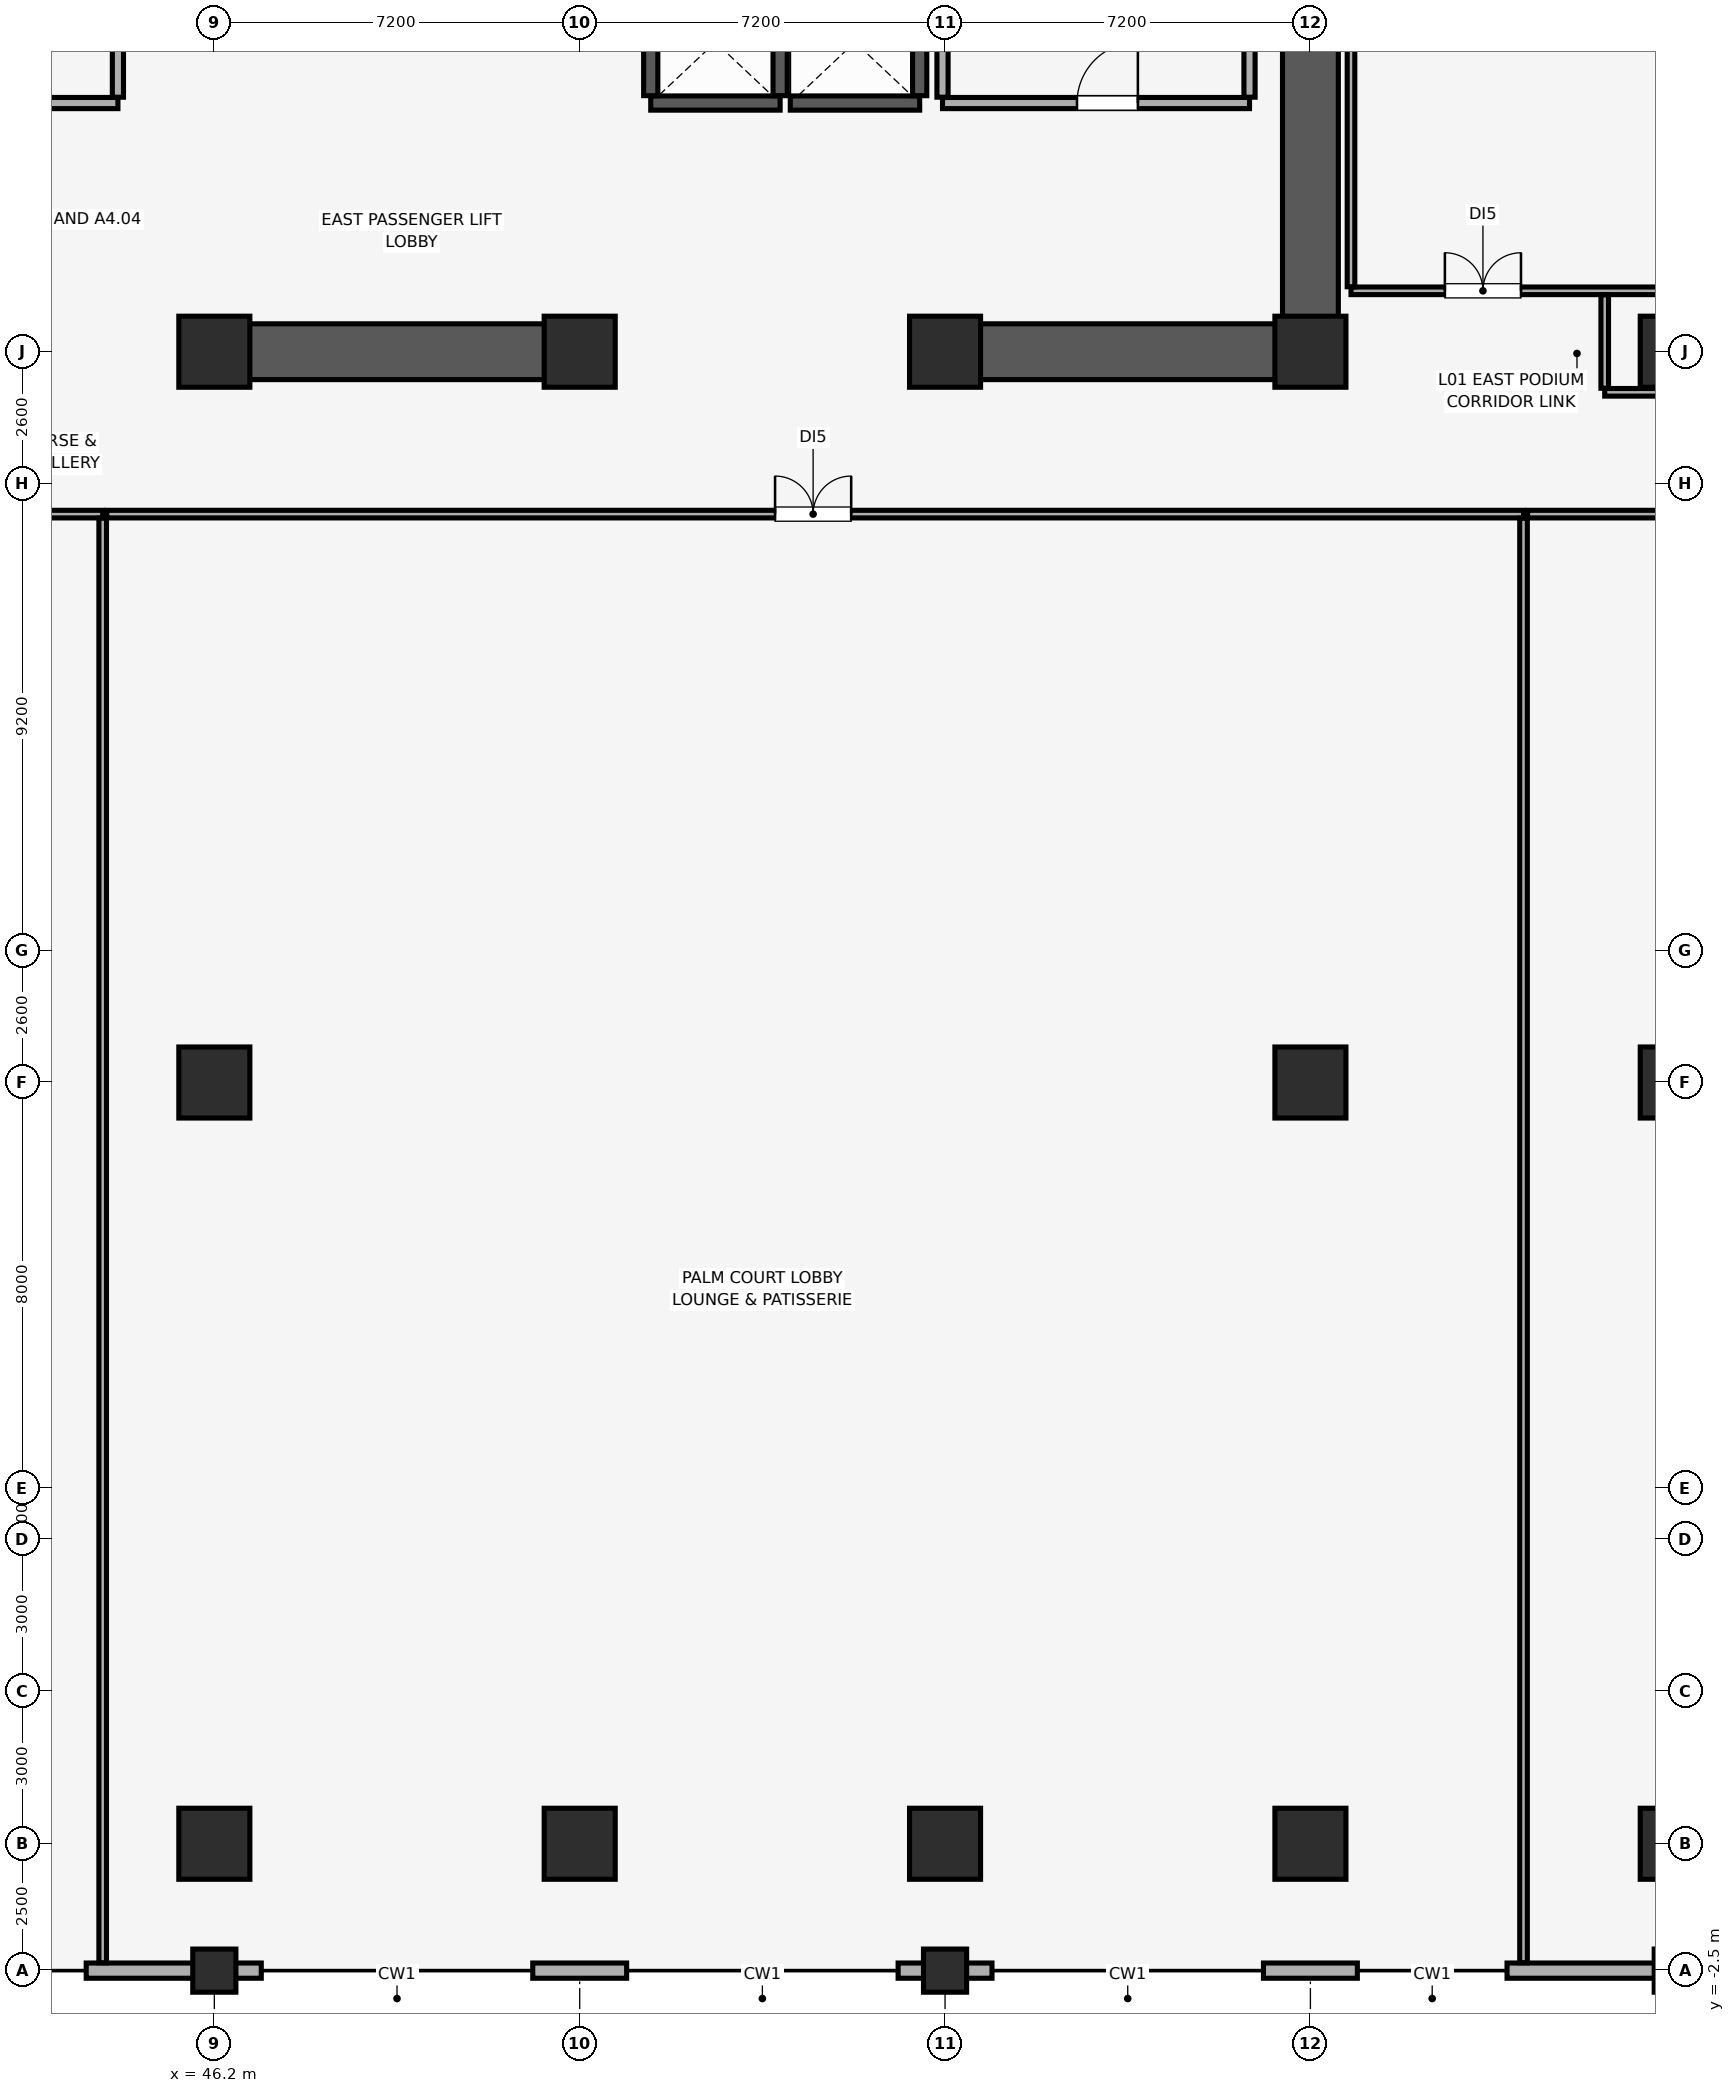
"""IFC4 building model, lengths in metres.
Left out: names, types, materials, properties, quantities, classifications, styles, units other than length and angle.
Written with IfcOpenShell. Run it as: python <this file> out.ifc"""

import sys

from ifc_helpers import new_model, si_unit, direction, frame, frame_2d, origin, origin_2d, place, context, subcontext, project, spatial, rectangle, extrude, element, fill, save


model = new_model("IFC4")
c1 = context("Model", 3, precision=1e-05, world=origin(), true_north=direction((0.0, 1.0)))
c2 = subcontext(c1, "Body", "Model", "MODEL_VIEW")
j1 = project(units=[si_unit("LENGTHUNIT", "METRE"), si_unit("PLANEANGLEUNIT", "RADIAN")], contexts=[c1])
p1 = place(None, origin())
s1 = spatial("IfcSite", under=j1, at=p1, CompositionType="ELEMENT")
p2 = place(p1, origin())
s2 = spatial("IfcBuilding", under=s1, at=p2, CompositionType="ELEMENT")
p3 = place(p2, frame((0.0, 0.0, 8.0)))
s3 = spatial("IfcBuildingStorey", under=s2, at=p3, CompositionType="ELEMENT", Elevation=8.0)
for number, where, z_axis, x_axis in (
    (1, (46.2, -2.5, 0.0), (0.0, 0.0, 1.0), (1.0, 0.0, 0.0)),
    (2, (60.6, -2.5, 0.0), (0.0, 0.0, 1.0), (1.0, 0.0, 0.0)),
    (3, (75.0, -2.5, 0.0), (0.0, 0.0, 1.0), (1.0, 0.0, 0.0)),
):
    element("IfcColumn", number, at=place(p3, frame(where, z_axis=z_axis, x_axis=x_axis)), inside=s3, PredefinedType="COLUMN", context=c2, shape_type="SweptSolid", body=[
        extrude(rectangle(XDim=0.85, YDim=0.85, at=origin_2d()), origin(), (0.0, 0.0, 1.0), 5.68),
    ])
for number, where, z_axis, x_axis in (
    (4, (46.2, 0.0, 0.0), (0.0, 0.0, 1.0), (1.0, 0.0, 0.0)),
    (5, (46.2, 29.4, 0.0), (0.0, 0.0, 1.0), (1.0, 0.0, 0.0)),
    (6, (53.4, 0.0, 0.0), (0.0, 0.0, 1.0), (1.0, 0.0, 0.0)),
    (7, (53.4, 29.4, 0.0), (0.0, 0.0, 1.0), (1.0, 0.0, 0.0)),
    (8, (60.6, 0.0, 0.0), (0.0, 0.0, 1.0), (1.0, 0.0, 0.0)),
    (9, (60.6, 29.4, 0.0), (0.0, 0.0, 1.0), (1.0, 0.0, 0.0)),
    (10, (67.8, 0.0, 0.0), (0.0, 0.0, 1.0), (1.0, 0.0, 0.0)),
    (11, (67.8, 29.4, 0.0), (0.0, 0.0, 1.0), (1.0, 0.0, 0.0)),
    (12, (75.0, 0.0, 0.0), (0.0, 0.0, 1.0), (1.0, 0.0, 0.0)),
    (13, (75.0, 29.4, 0.0), (0.0, 0.0, 1.0), (1.0, 0.0, 0.0)),
    (14, (46.2, 15.0, 0.0), (0.0, 0.0, 1.0), (1.0, 0.0, 0.0)),
    (15, (75.0, 15.0, 0.0), (0.0, 0.0, 1.0), (1.0, 0.0, 0.0)),
    (16, (67.8, 15.0, 0.0), (0.0, 0.0, 1.0), (1.0, 0.0, 0.0)),
):
    element("IfcColumn", number, at=place(p3, frame(where, z_axis=z_axis, x_axis=x_axis)), inside=s3, PredefinedType="COLUMN", context=c2, shape_type="SweptSolid", body=[
        extrude(rectangle(XDim=1.4, YDim=1.4, at=origin_2d()), origin(), (0.0, 0.0, 1.0), 5.68),
    ])
p4 = place(p3, frame((43.675, -2.5, 0.0), z_axis=(0.0, 0.0, 1.0), x_axis=(1.0, 0.0, 0.0)))
e17 = element("IfcWall", 17, at=p4, inside=s3, PredefinedType="SOLIDWALL", context=c2, shape_type="SweptSolid", body=[
    extrude(rectangle(XDim=3.45, YDim=0.3, at=frame_2d((1.725, 0.0))), origin(), (0.0, 0.0, 1.0), 4.73),
])
for number, where, z_axis, x_axis in (
    (18, (52.475, -2.5, 0.0), (0.0, 0.0, 1.0), (1.0, 0.0, 0.0)),
    (19, (59.675, -2.5, 0.0), (0.0, 0.0, 1.0), (1.0, 0.0, 0.0)),
):
    element("IfcWall", number, at=place(p3, frame(where, z_axis=z_axis, x_axis=x_axis)), inside=s3, PredefinedType="SOLIDWALL", context=c2, shape_type="SweptSolid", body=[
        extrude(rectangle(XDim=1.85, YDim=0.3, at=frame_2d((0.925, 0.0))), origin(), (0.0, 0.0, 1.0), 4.73),
    ])
p5 = place(p3, frame((66.875, -2.5, 0.0), z_axis=(0.0, 0.0, 1.0), x_axis=(1.0, 0.0, 0.0)))
e20 = element("IfcWall", 20, at=p5, inside=s3, PredefinedType="SOLIDWALL", context=c2, shape_type="SweptSolid", body=[
    extrude(rectangle(XDim=1.85, YDim=0.3, at=frame_2d((0.925, 0.0))), origin(), (0.0, 0.0, 1.0), 4.73),
])
p6 = place(p3, frame((71.675, -2.5, 0.0), z_axis=(0.0, 0.0, 1.0), x_axis=(1.0, 0.0, 0.0)))
e21 = element("IfcWall", 21, at=p6, inside=s3, PredefinedType="SOLIDWALL", context=c2, shape_type="SweptSolid", body=[
    extrude(rectangle(XDim=11.925, YDim=0.3, at=frame_2d((5.962, 0.0))), origin(), (0.0, 0.0, 1.0), 4.73),
])
p7 = place(p6, frame((5.05, 0.0, 0.85)))
e22 = element("IfcOpeningElement", 22, at=p7, cuts=e21, PredefinedType="OPENING", context=c2, shape_type="SweptSolid", body=[
    extrude(rectangle(XDim=5.4, YDim=2.4, at=frame_2d((2.7, 1.2))), frame((0.0, 0.16, 0.0), z_axis=(0.0, -1.0, 0.0), x_axis=(1.0, 0.0, 0.0)), (0.0, 0.0, 1.0), 0.32),
])
p8 = place(p3, frame((67.8, 29.4, 0.0), z_axis=(0.0, 0.0, 1.0), x_axis=(0.0, 1.0, 0.0)))
e23 = element("IfcWall", 23, at=p8, inside=s3, PredefinedType="SHEAR", context=c2, shape_type="SweptSolid", body=[
    extrude(rectangle(XDim=19.2, YDim=1.1, at=frame_2d((9.6, 0.0))), origin(), (0.0, 0.0, 1.0), 5.68),
])
p9 = place(p3, frame((46.0, 29.4, 0.0), z_axis=(0.0, 0.0, 1.0), x_axis=(1.0, 0.0, 0.0)))
e24 = element("IfcWall", 24, at=p9, inside=s3, PredefinedType="SHEAR", context=c2, shape_type="SweptSolid", body=[
    extrude(rectangle(XDim=7.6, YDim=1.1, at=frame_2d((3.8, 0.0))), origin(), (0.0, 0.0, 1.0), 5.68),
])
p10 = place(p3, frame((60.4, 29.4, 0.0), z_axis=(0.0, 0.0, 1.0), x_axis=(1.0, 0.0, 0.0)))
e25 = element("IfcWall", 25, at=p10, inside=s3, PredefinedType="SHEAR", context=c2, shape_type="SweptSolid", body=[
    extrude(rectangle(XDim=6.845, YDim=1.1, at=frame_2d((3.423, 0.0))), origin(), (0.0, 0.0, 1.0), 5.68),
])
p11 = place(p3, frame((54.8, 34.3, 0.0), z_axis=(0.0, 0.0, 1.0), x_axis=(1.0, 0.0, 0.0)))
e26 = element("IfcWall", 26, at=p11, inside=s3, PredefinedType="SHEAR", context=c2, shape_type="SweptSolid", body=[
    extrude(rectangle(XDim=2.55, YDim=0.28, at=frame_2d((1.275, 0.0))), origin(), (0.0, 0.0, 1.0), 5.68),
])
for number, where, z_axis, x_axis in (
    (27, (54.8, 34.445, 0.0), (0.0, 0.0, 1.0), (0.0, 1.0, 0.0)),
    (28, (57.35, 34.445, 0.0), (0.0, 0.0, 1.0), (0.0, 1.0, 0.0)),
):
    element("IfcWall", number, at=place(p3, frame(where, z_axis=z_axis, x_axis=x_axis)), inside=s3, PredefinedType="SHEAR", context=c2, shape_type="SweptSolid", body=[
        extrude(rectangle(XDim=2.11, YDim=0.28, at=frame_2d((1.055, 0.0))), origin(), (0.0, 0.0, 1.0), 5.68),
    ])
p12 = place(p3, frame((57.55, 34.3, 0.0), z_axis=(0.0, 0.0, 1.0), x_axis=(1.0, 0.0, 0.0)))
e29 = element("IfcWall", 29, at=p12, inside=s3, PredefinedType="SHEAR", context=c2, shape_type="SweptSolid", body=[
    extrude(rectangle(XDim=2.55, YDim=0.28, at=frame_2d((1.275, 0.0))), origin(), (0.0, 0.0, 1.0), 5.68),
])
p13 = place(p3, frame((60.1, 34.445, 0.0), z_axis=(0.0, 0.0, 1.0), x_axis=(0.0, 1.0, 0.0)))
e30 = element("IfcWall", 30, at=p13, inside=s3, PredefinedType="SHEAR", context=c2, shape_type="SweptSolid", body=[
    extrude(rectangle(XDim=2.11, YDim=0.28, at=frame_2d((1.055, 0.0))), origin(), (0.0, 0.0, 1.0), 5.68),
])
p14 = place(p3, frame((60.55, 34.3, 0.0), z_axis=(0.0, 0.0, 1.0), x_axis=(1.0, 0.0, 0.0)))
e31 = element("IfcWall", 31, at=p14, inside=s3, PredefinedType="PARTITIONING", context=c2, shape_type="SweptSolid", body=[
    extrude(rectangle(XDim=6.05, YDim=0.22, at=frame_2d((3.025, 0.0))), origin(), (0.0, 0.0, 1.0), 5.68),
])
p15 = place(p14, frame((2.65, 0.0, 0.0)))
e32 = element("IfcOpeningElement", 32, at=p15, cuts=e31, PredefinedType="OPENING", context=c2, shape_type="SweptSolid", body=[
    extrude(rectangle(XDim=1.2, YDim=2.15, at=frame_2d((0.6, 1.075))), frame((0.0, 0.12, 0.0), z_axis=(0.0, -1.0, 0.0), x_axis=(1.0, 0.0, 0.0)), (0.0, 0.0, 1.0), 0.24),
])
p16 = place(p3, frame((60.55, 34.415, 0.0), z_axis=(0.0, 0.0, 1.0), x_axis=(0.0, 1.0, 0.0)))
e33 = element("IfcWall", 33, at=p16, inside=s3, PredefinedType="PARTITIONING", context=c2, shape_type="SweptSolid", body=[
    extrude(rectangle(XDim=5.64, YDim=0.22, at=frame_2d((2.82, 0.0))), origin(), (0.0, 0.0, 1.0), 5.68),
])
p17 = place(p3, frame((66.6, 34.415, 0.0), z_axis=(0.0, 0.0, 1.0), x_axis=(0.0, 1.0, 0.0)))
e34 = element("IfcWall", 34, at=p17, inside=s3, PredefinedType="PARTITIONING", context=c2, shape_type="SweptSolid", body=[
    extrude(rectangle(XDim=5.43, YDim=0.22, at=frame_2d((2.715, 0.0))), origin(), (0.0, 0.0, 1.0), 5.68),
])
p18 = place(p3, frame((39.7, 34.3, 0.0), z_axis=(0.0, 0.0, 1.0), x_axis=(1.0, 0.0, 0.0)))
e35 = element("IfcWall", 35, at=p18, inside=s3, PredefinedType="PARTITIONING", context=c2, shape_type="SweptSolid", body=[
    extrude(rectangle(XDim=4.6, YDim=0.22, at=frame_2d((2.3, 0.0))), origin(), (0.0, 0.0, 1.0), 5.68),
])
p19 = place(p18, frame((1.7, 0.0, 0.0)))
e36 = element("IfcOpeningElement", 36, at=p19, cuts=e35, PredefinedType="OPENING", context=c2, shape_type="SweptSolid", body=[
    extrude(rectangle(XDim=1.2, YDim=2.15, at=frame_2d((0.6, 1.075))), frame((0.0, 0.12, 0.0), z_axis=(0.0, -1.0, 0.0), x_axis=(1.0, 0.0, 0.0)), (0.0, 0.0, 1.0), 0.24),
])
p20 = place(p3, frame((44.3, 34.415, 0.0), z_axis=(0.0, 0.0, 1.0), x_axis=(0.0, 1.0, 0.0)))
e37 = element("IfcWall", 37, at=p20, inside=s3, PredefinedType="PARTITIONING", context=c2, shape_type="SweptSolid", body=[
    extrude(rectangle(XDim=5.785, YDim=0.22, at=frame_2d((2.893, 0.0))), origin(), (0.0, 0.0, 1.0), 5.68),
])
p21 = place(p3, frame((68.6, 30.6, 0.0), z_axis=(0.0, 0.0, 1.0), x_axis=(1.0, 0.0, 0.0)))
e38 = element("IfcWall", 38, at=p21, inside=s3, PredefinedType="PARTITIONING", context=c2, shape_type="SweptSolid", body=[
    extrude(rectangle(XDim=18.445, YDim=0.15, at=frame_2d((9.222, 0.0))), origin(), (0.0, 0.0, 1.0), 5.68),
])
p22 = place(p21, frame((1.85, 0.0, 0.0)))
e39 = element("IfcOpeningElement", 39, at=p22, cuts=e38, PredefinedType="OPENING", context=c2, shape_type="SweptSolid", body=[
    extrude(rectangle(XDim=1.5, YDim=2.25, at=frame_2d((0.75, 1.125))), frame((0.0, 0.085, 0.0), z_axis=(0.0, -1.0, 0.0), x_axis=(1.0, 0.0, 0.0)), (0.0, 0.0, 1.0), 0.17),
])
p23 = place(p3, frame((68.6, 30.68, 0.0), z_axis=(0.0, 0.0, 1.0), x_axis=(0.0, 1.0, 0.0)))
e40 = element("IfcWall", 40, at=p23, inside=s3, PredefinedType="PARTITIONING", context=c2, shape_type="SweptSolid", body=[
    extrude(rectangle(XDim=21.665, YDim=0.15, at=frame_2d((10.833, 0.0))), origin(), (0.0, 0.0, 1.0), 5.68),
])
p24 = place(p3, frame((73.6, 28.6, 0.0), z_axis=(0.0, 0.0, 1.0), x_axis=(1.0, 0.0, 0.0)))
e41 = element("IfcWall", 41, at=p24, inside=s3, PredefinedType="PARTITIONING", context=c2, shape_type="SweptSolid", body=[
    extrude(rectangle(XDim=13.445, YDim=0.15, at=frame_2d((6.722, 0.0))), origin(), (0.0, 0.0, 1.0), 5.68),
])
p25 = place(p24, frame((5.9, 0.0, 0.0)))
e42 = element("IfcOpeningElement", 42, at=p25, cuts=e41, PredefinedType="OPENING", context=c2, shape_type="SweptSolid", body=[
    extrude(rectangle(XDim=1.0, YDim=2.15, at=frame_2d((0.5, 1.075))), frame((0.0, 0.085, 0.0), z_axis=(0.0, -1.0, 0.0), x_axis=(1.0, 0.0, 0.0)), (0.0, 0.0, 1.0), 0.17),
])
p26 = place(p3, frame((73.6, 28.68, 0.0), z_axis=(0.0, 0.0, 1.0), x_axis=(0.0, 1.0, 0.0)))
e43 = element("IfcWall", 43, at=p26, inside=s3, PredefinedType="PARTITIONING", context=c2, shape_type="SweptSolid", body=[
    extrude(rectangle(XDim=1.84, YDim=0.15, at=frame_2d((0.92, 0.0))), origin(), (0.0, 0.0, 1.0), 5.68),
])
p27 = place(p3, frame((9.0, 26.2, 0.0), z_axis=(0.0, 0.0, 1.0), x_axis=(1.0, 0.0, 0.0)))
e44 = element("IfcWall", 44, at=p27, inside=s3, PredefinedType="PARTITIONING", context=c2, shape_type="SweptSolid", body=[
    extrude(rectangle(XDim=35.0, YDim=0.15, at=frame_2d((17.5, 0.0))), origin(), (0.0, 0.0, 1.0), 5.68),
])
p28 = place(p27, frame((17.25, 0.0, 0.0)))
e45 = element("IfcOpeningElement", 45, at=p28, cuts=e44, PredefinedType="OPENING", context=c2, shape_type="SweptSolid", body=[
    extrude(rectangle(XDim=1.5, YDim=2.25, at=frame_2d((0.75, 1.125))), frame((0.0, 0.085, 0.0), z_axis=(0.0, -1.0, 0.0), x_axis=(1.0, 0.0, 0.0)), (0.0, 0.0, 1.0), 0.17),
])
p29 = place(p3, frame((44.0, -2.345, 0.0), z_axis=(0.0, 0.0, 1.0), x_axis=(0.0, 1.0, 0.0)))
e46 = element("IfcWall", 46, at=p29, inside=s3, PredefinedType="PARTITIONING", context=c2, shape_type="SweptSolid", body=[
    extrude(rectangle(XDim=28.465, YDim=0.15, at=frame_2d((14.232, 0.0))), origin(), (0.0, 0.0, 1.0), 5.68),
])
p30 = place(p3, frame((44.08, 26.2, 0.0), z_axis=(0.0, 0.0, 1.0), x_axis=(1.0, 0.0, 0.0)))
e47 = element("IfcWall", 47, at=p30, inside=s3, PredefinedType="PARTITIONING", context=c2, shape_type="SweptSolid", body=[
    extrude(rectangle(XDim=27.92, YDim=0.15, at=frame_2d((13.96, 0.0))), origin(), (0.0, 0.0, 1.0), 5.68),
])
p31 = place(p30, frame((13.17, 0.0, 0.0)))
e48 = element("IfcOpeningElement", 48, at=p31, cuts=e47, PredefinedType="OPENING", context=c2, shape_type="SweptSolid", body=[
    extrude(rectangle(XDim=1.5, YDim=2.25, at=frame_2d((0.75, 1.125))), frame((0.0, 0.085, 0.0), z_axis=(0.0, -1.0, 0.0), x_axis=(1.0, 0.0, 0.0)), (0.0, 0.0, 1.0), 0.17),
])
p32 = place(p3, frame((72.0, -2.345, 0.0), z_axis=(0.0, 0.0, 1.0), x_axis=(0.0, 1.0, 0.0)))
e49 = element("IfcWall", 49, at=p32, inside=s3, PredefinedType="PARTITIONING", context=c2, shape_type="SweptSolid", body=[
    extrude(rectangle(XDim=28.465, YDim=0.15, at=frame_2d((14.232, 0.0))), origin(), (0.0, 0.0, 1.0), 5.68),
])
p33 = place(p3, frame((72.08, 26.2, 0.0), z_axis=(0.0, 0.0, 1.0), x_axis=(1.0, 0.0, 0.0)))
e50 = element("IfcWall", 50, at=p33, inside=s3, PredefinedType="PARTITIONING", context=c2, shape_type="SweptSolid", body=[
    extrude(rectangle(XDim=14.965, YDim=0.15, at=frame_2d((7.482, 0.0))), origin(), (0.0, 0.0, 1.0), 5.68),
])
p34 = place(p33, frame((7.17, 0.0, 0.0)))
e51 = element("IfcOpeningElement", 51, at=p34, cuts=e50, PredefinedType="OPENING", context=c2, shape_type="SweptSolid", body=[
    extrude(rectangle(XDim=1.5, YDim=2.25, at=frame_2d((0.75, 1.125))), frame((0.0, 0.085, 0.0), z_axis=(0.0, -1.0, 0.0), x_axis=(1.0, 0.0, 0.0)), (0.0, 0.0, 1.0), 0.17),
])
p35 = place(p15, origin())
e52 = element("IfcDoor", 52, at=p35, inside=s3, OperationType="SINGLE_SWING_RIGHT", PredefinedType="DOOR", context=c2, shape_type="SweptSolid", body=[
    extrude(rectangle(XDim=1.2, YDim=2.15, at=frame_2d((0.6, 1.075))), frame((0.0, 0.025, 0.0), z_axis=(0.0, -1.0, 0.0), x_axis=(1.0, 0.0, 0.0)), (0.0, 0.0, 1.0), 0.05),
])
fill(e32, e52)
p36 = place(p22, origin())
e53 = element("IfcDoor", 53, at=p36, inside=s3, OperationType="DOUBLE_DOOR_SINGLE_SWING", PredefinedType="DOOR", context=c2, shape_type="SweptSolid", body=[
    extrude(rectangle(XDim=1.5, YDim=2.25, at=frame_2d((0.75, 1.125))), frame((0.0, 0.025, 0.0), z_axis=(0.0, -1.0, 0.0), x_axis=(1.0, 0.0, 0.0)), (0.0, 0.0, 1.0), 0.05),
])
fill(e39, e53)
p37 = place(p31, origin())
e54 = element("IfcDoor", 54, at=p37, inside=s3, OperationType="DOUBLE_DOOR_SINGLE_SWING", PredefinedType="DOOR", context=c2, shape_type="SweptSolid", body=[
    extrude(rectangle(XDim=1.5, YDim=2.25, at=frame_2d((0.75, 1.125))), frame((0.0, 0.025, 0.0), z_axis=(0.0, -1.0, 0.0), x_axis=(1.0, 0.0, 0.0)), (0.0, 0.0, 1.0), 0.05),
])
fill(e48, e54)
save(model, sys.argv[1])
